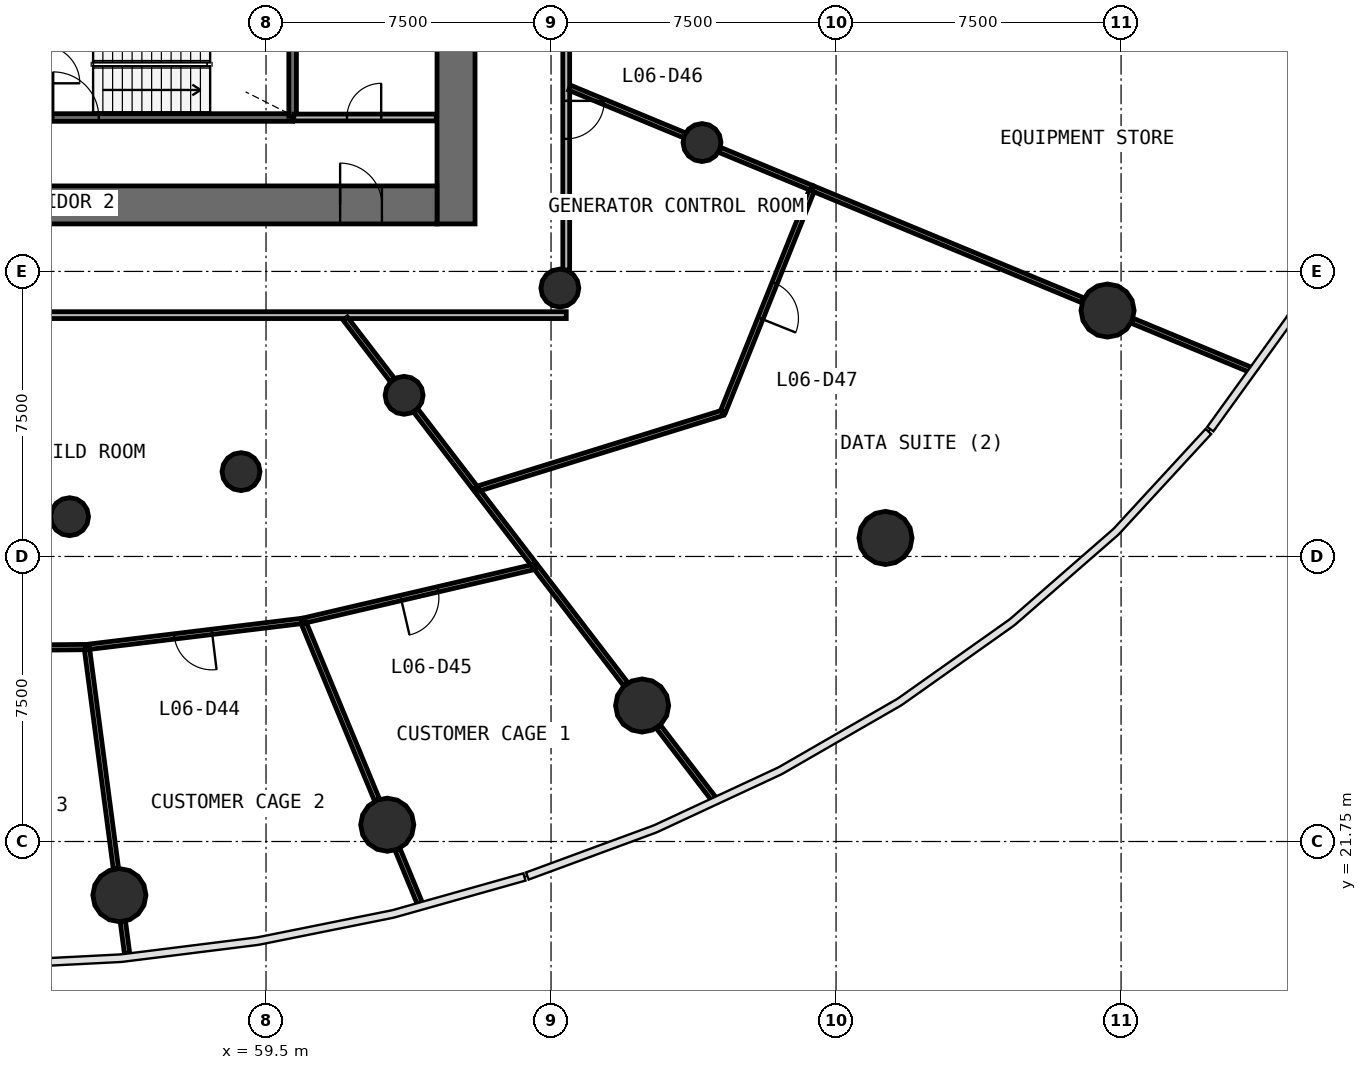
"""IFC4 building model, lengths in metres.
Left out: names, types, materials, properties, quantities, classifications, styles, units other than length and angle.
Written with IfcOpenShell. Run it as: python <this file> out.ifc"""

import sys

from ifc_helpers import new_model, si_unit, direction, frame, frame_2d, origin, origin_2d, place, context, subcontext, project, spatial, rectangle, circle, extrude, source, transform, mapped, element, fill, save


model = new_model("IFC4")
c1 = context("Model", 3, precision=1e-05, world=origin(), true_north=direction((0.0, 1.0)))
c2 = subcontext(c1, "Body", "Model", "MODEL_VIEW")
j1 = project(units=[si_unit("LENGTHUNIT", "METRE"), si_unit("PLANEANGLEUNIT", "RADIAN")], contexts=[c1])
p1 = place(None, origin())
s1 = spatial("IfcSite", under=j1, at=p1, CompositionType="ELEMENT")
p2 = place(p1, origin())
s2 = spatial("IfcBuilding", under=s1, at=p2, CompositionType="ELEMENT")
p3 = place(p2, frame((0.0, 0.0, 27.0)))
s3 = spatial("IfcBuildingStorey", under=s2, at=p3, CompositionType="ELEMENT", Elevation=27.0)
p4 = place(p3, frame((64.5, 38.0, 0.0), z_axis=(0.0, 0.0, 1.0), x_axis=(0.0, 1.0, 0.0)))
e1 = element("IfcWall", 1, at=p4, inside=s3, PredefinedType="SHEAR", context=c2, shape_type="SweptSolid", body=[
    extrude(rectangle(XDim=20.0, YDim=1.0, at=frame_2d((10.0, 0.0))), origin(), (0.0, 0.0, 1.0), 4.4),
])
p5 = place(p4, frame((9.1, 0.0, 0.0)))
e2 = element("IfcOpeningElement", 2, at=p5, cuts=e1, PredefinedType="OPENING", context=c2, shape_type="SweptSolid", body=[
    extrude(rectangle(XDim=1.8, YDim=2.1, at=frame_2d((0.9, 1.05))), frame((0.0, 0.51, 0.0), z_axis=(0.0, -1.0, 0.0), x_axis=(1.0, 0.0, 0.0)), (0.0, 0.0, 1.0), 1.02),
])
p6 = place(p3, frame((40.0, 38.5, 0.0), z_axis=(0.0, 0.0, 1.0), x_axis=(1.0, 0.0, 0.0)))
e3 = element("IfcWall", 3, at=p6, inside=s3, PredefinedType="SHEAR", context=c2, shape_type="SweptSolid", body=[
    extrude(rectangle(XDim=24.0, YDim=1.0, at=frame_2d((12.0, 0.0))), origin(), (0.0, 0.0, 1.0), 4.4),
])
p7 = place(p6, frame((21.45, 0.0, 0.0)))
e4 = element("IfcOpeningElement", 4, at=p7, cuts=e3, PredefinedType="OPENING", context=c2, shape_type="SweptSolid", body=[
    extrude(rectangle(XDim=1.1, YDim=2.1, at=frame_2d((0.55, 1.05))), frame((0.0, 0.51, 0.0), z_axis=(0.0, -1.0, 0.0), x_axis=(1.0, 0.0, 0.0)), (0.0, 0.0, 1.0), 1.02),
])
p8 = place(p6, frame((1.95, 0.0, 0.0)))
e5 = element("IfcOpeningElement", 5, at=p8, cuts=e3, PredefinedType="OPENING", context=c2, shape_type="SweptSolid", body=[
    extrude(rectangle(XDim=1.1, YDim=2.1, at=frame_2d((0.55, 1.05))), frame((0.0, 0.51, 0.0), z_axis=(0.0, -1.0, 0.0), x_axis=(1.0, 0.0, 0.0)), (0.0, 0.0, 1.0), 1.02),
])
m1 = source(origin(), c2, "Body", "SweptSolid", [
    extrude(circle(Radius=0.7, at=origin_2d()), origin(), (0.0, 0.0, 1.0), 4.4),
])
for number, where, z_axis, x_axis in (
    (6, (55.642, 20.339, 0.0), (0.0, 0.0, 1.0), (1.0, 0.0, 0.0)),
    (7, (62.69, 22.191, 0.0), (0.0, 0.0, 1.0), (1.0, 0.0, 0.0)),
    (8, (69.396, 25.328, 0.0), (0.0, 0.0, 1.0), (1.0, 0.0, 0.0)),
    (9, (75.801, 29.737, 0.0), (0.0, 0.0, 1.0), (1.0, 0.0, 0.0)),
    (10, (81.645, 35.721, 0.0), (0.0, 0.0, 1.0), (1.0, 0.0, 0.0)),
):
    element("IfcColumn", number, at=place(p3, frame(where, z_axis=z_axis, x_axis=x_axis)), inside=s3, PredefinedType="COLUMN", context=c2, shape_type="MappedRepresentation", body=[
        mapped(m1, transform((0.0, 0.0, 0.0), scale=1.0)),
    ])
m2 = source(origin(), c2, "Body", "SweptSolid", [
    extrude(circle(Radius=0.5, at=origin_2d()), origin(), (0.0, 0.0, 1.0), 4.4),
])
for number, where, z_axis, x_axis in (
    (11, (54.331, 30.297, 0.0), (0.0, 0.0, 1.0), (1.0, 0.0, 0.0)),
    (12, (58.842, 31.482, 0.0), (0.0, 0.0, 1.0), (1.0, 0.0, 0.0)),
    (13, (63.134, 33.49, 0.0), (0.0, 0.0, 1.0), (1.0, 0.0, 0.0)),
    (14, (67.232, 36.312, 0.0), (0.0, 0.0, 1.0), (1.0, 0.0, 0.0)),
    (15, (70.972, 40.141, 0.0), (0.0, 0.0, 1.0), (1.0, 0.0, 0.0)),
):
    element("IfcColumn", number, at=place(p3, frame(where, z_axis=z_axis, x_axis=x_axis)), inside=s3, PredefinedType="COLUMN", context=c2, shape_type="MappedRepresentation", body=[
        mapped(m2, transform((0.0, 0.0, 0.0), scale=1.0)),
    ])
p9 = place(p3, frame((53.6, 40.8, 0.0), z_axis=(0.0, 0.0, 1.0), x_axis=(1.0, 0.0, 0.0)))
e16 = element("IfcWall", 16, at=p9, inside=s3, PredefinedType="SOLIDWALL", context=c2, shape_type="SweptSolid", body=[
    extrude(rectangle(XDim=6.6, YDim=0.2, at=frame_2d((3.3, 0.0))), origin(), (0.0, 0.0, 1.0), 3.95),
])
p10 = place(p9, frame((0.3, 0.0, 0.0)))
e17 = element("IfcOpeningElement", 17, at=p10, cuts=e16, PredefinedType="OPENING", context=c2, shape_type="SweptSolid", body=[
    extrude(rectangle(XDim=1.2, YDim=2.1, at=frame_2d((0.6, 1.05))), frame((0.0, 0.11, 0.0), z_axis=(0.0, -1.0, 0.0), x_axis=(1.0, 0.0, 0.0)), (0.0, 0.0, 1.0), 0.22),
])
p11 = place(p3, frame((60.2, 40.83, 0.0), z_axis=(0.0, 0.0, 1.0), x_axis=(0.0, 1.0, 0.0)))
e18 = element("IfcWall", 18, at=p11, inside=s3, PredefinedType="SOLIDWALL", context=c2, shape_type="SweptSolid", body=[
    extrude(rectangle(XDim=2.77, YDim=0.2, at=frame_2d((1.385, 0.0))), origin(), (0.0, 0.0, 1.0), 3.95),
])
p12 = place(p3, frame((67.4, 35.6, 0.0), z_axis=(0.0, 0.0, 1.0), x_axis=(-1.0, 0.0, 0.0)))
e19 = element("IfcWall", 19, at=p12, inside=s3, PredefinedType="PARTITIONING", context=c2, shape_type="SweptSolid", body=[
    extrude(rectangle(XDim=30.8, YDim=0.18, at=frame_2d((15.4, 0.0))), origin(), (0.0, 0.0, 1.0), 3.05),
])
p13 = place(p12, frame((17.35, 0.0, 0.0)))
e20 = element("IfcOpeningElement", 20, at=p13, cuts=e19, PredefinedType="OPENING", context=c2, shape_type="SweptSolid", body=[
    extrude(rectangle(XDim=1.0, YDim=2.1, at=frame_2d((0.5, 1.05))), frame((0.0, 0.1, 0.0), z_axis=(0.0, -1.0, 0.0), x_axis=(1.0, 0.0, 0.0)), (0.0, 0.0, 1.0), 0.2),
])
p14 = place(p12, frame((14.95, 0.0, 0.0)))
e21 = element("IfcOpeningElement", 21, at=p14, cuts=e19, PredefinedType="OPENING", context=c2, shape_type="SweptSolid", body=[
    extrude(rectangle(XDim=1.0, YDim=2.1, at=frame_2d((0.5, 1.05))), frame((0.0, 0.1, 0.0), z_axis=(0.0, -1.0, 0.0), x_axis=(1.0, 0.0, 0.0)), (0.0, 0.0, 1.0), 0.2),
])
p15 = place(p3, frame((67.4, 60.37, 0.0), z_axis=(0.0, 0.0, 1.0), x_axis=(0.0, -1.0, 0.0)))
e22 = element("IfcWall", 22, at=p15, inside=s3, PredefinedType="PARTITIONING", context=c2, shape_type="SweptSolid", body=[
    extrude(rectangle(XDim=23.583, YDim=0.18, at=frame_2d((11.791, 0.0))), origin(), (0.0, 0.0, 1.0), 3.05),
])
p16 = place(p15, frame((11.833, 0.0, 0.0)))
e23 = element("IfcOpeningElement", 23, at=p16, cuts=e22, PredefinedType="OPENING", context=c2, shape_type="SweptSolid", body=[
    extrude(rectangle(XDim=0.9, YDim=2.1, at=frame_2d((0.45, 1.05))), frame((0.0, 0.1, 0.0), z_axis=(0.0, -1.0, 0.0), x_axis=(1.0, 0.0, 0.0)), (0.0, 0.0, 1.0), 0.2),
])
p17 = place(p15, frame((10.433, 0.0, 0.0)))
e24 = element("IfcOpeningElement", 24, at=p17, cuts=e22, PredefinedType="OPENING", context=c2, shape_type="SweptSolid", body=[
    extrude(rectangle(XDim=0.9, YDim=2.1, at=frame_2d((0.45, 1.05))), frame((0.0, 0.1, 0.0), z_axis=(0.0, -1.0, 0.0), x_axis=(1.0, 0.0, 0.0)), (0.0, 0.0, 1.0), 0.2),
])
p18 = place(p15, frame((7.833, 0.0, 0.0)))
e25 = element("IfcOpeningElement", 25, at=p18, cuts=e22, PredefinedType="OPENING", context=c2, shape_type="SweptSolid", body=[
    extrude(rectangle(XDim=0.9, YDim=2.1, at=frame_2d((0.45, 1.05))), frame((0.0, 0.1, 0.0), z_axis=(0.0, -1.0, 0.0), x_axis=(1.0, 0.0, 0.0)), (0.0, 0.0, 1.0), 0.2),
])
p19 = place(p15, frame((19.133, 0.0, 0.0)))
e26 = element("IfcOpeningElement", 26, at=p19, cuts=e22, PredefinedType="OPENING", context=c2, shape_type="SweptSolid", body=[
    extrude(rectangle(XDim=1.0, YDim=2.1, at=frame_2d((0.5, 1.05))), frame((0.0, 0.1, 0.0), z_axis=(0.0, -1.0, 0.0), x_axis=(1.0, 0.0, 0.0)), (0.0, 0.0, 1.0), 0.2),
])
p20 = place(p15, frame((14.732, 0.0, 0.0)))
e27 = element("IfcOpeningElement", 27, at=p20, cuts=e22, PredefinedType="OPENING", context=c2, shape_type="SweptSolid", body=[
    extrude(rectangle(XDim=1.0, YDim=2.1, at=frame_2d((0.5, 1.05))), frame((0.0, 0.1, 0.0), z_axis=(0.0, -1.0, 0.0), x_axis=(1.0, 0.0, 0.0)), (0.0, 0.0, 1.0), 0.2),
])
p21 = place(p3, frame((60.23, 40.8, 0.0), z_axis=(0.0, 0.0, 1.0), x_axis=(1.0, 0.0, 0.0)))
e28 = element("IfcWall", 28, at=p21, inside=s3, PredefinedType="PARTITIONING", context=c2, shape_type="SweptSolid", body=[
    extrude(rectangle(XDim=3.75, YDim=0.18, at=frame_2d((1.875, 0.0))), origin(), (0.0, 0.0, 1.0), 3.95),
])
p22 = place(p21, frame((1.4, 0.0, 0.0)))
e29 = element("IfcOpeningElement", 29, at=p22, cuts=e28, PredefinedType="OPENING", context=c2, shape_type="SweptSolid", body=[
    extrude(rectangle(XDim=0.9, YDim=2.1, at=frame_2d((0.45, 1.05))), frame((0.0, 0.1, 0.0), z_axis=(0.0, -1.0, 0.0), x_axis=(1.0, 0.0, 0.0)), (0.0, 0.0, 1.0), 0.2),
])
p23 = place(p3, frame((73.883, 38.936, 0.0), z_axis=(0.0, 0.0, 1.0), x_axis=(0.923874550421, -0.382695459974, 0.0)))
e30 = element("IfcWall", 30, at=p23, inside=s3, PredefinedType="PARTITIONING", context=c2, shape_type="SweptSolid", body=[
    extrude(rectangle(XDim=7.696, YDim=0.14, at=frame_2d((3.848, 0.0))), origin(), (0.0, 0.0, 1.0), 3.05),
])
p24 = place(p3, frame((65.03, 31.02, 0.0), z_axis=(0.0, 0.0, 1.0), x_axis=(0.955222723313, 0.295887730172, 0.0)))
e31 = element("IfcWall", 31, at=p24, inside=s3, PredefinedType="PARTITIONING", context=c2, shape_type="SweptSolid", body=[
    extrude(rectangle(XDim=6.787, YDim=0.14, at=frame_2d((3.393, 0.0))), origin(), (0.0, 0.0, 1.0), 3.05),
])
p25 = place(p3, frame((73.857, 38.871, 0.0), z_axis=(0.0, 0.0, 1.0), x_axis=(-0.372364534272, -0.928086555024, 0.0)))
e32 = element("IfcWall", 32, at=p25, inside=s3, PredefinedType="PARTITIONING", context=c2, shape_type="SweptSolid", body=[
    extrude(rectangle(XDim=6.266, YDim=0.14, at=frame_2d((3.133, 0.0))), origin(), (0.0, 0.0, 1.0), 3.05),
])
p26 = place(p25, frame((2.616, 0.0, 0.0)))
e33 = element("IfcOpeningElement", 33, at=p26, cuts=e32, PredefinedType="OPENING", context=c2, shape_type="SweptSolid", body=[
    extrude(rectangle(XDim=1.0, YDim=2.1, at=frame_2d((0.5, 1.05))), frame((0.0, 0.08, 0.0), z_axis=(0.0, -1.0, 0.0), x_axis=(1.0, 0.0, 0.0)), (0.0, 0.0, 1.0), 0.16),
])
p27 = place(p3, frame((66.592, 28.984, 0.0), z_axis=(0.0, 0.0, 1.0), x_axis=(-0.973907326405, -0.226946071954, 0.0)))
e34 = element("IfcWall", 34, at=p27, inside=s3, PredefinedType="PARTITIONING", context=c2, shape_type="SweptSolid", body=[
    extrude(rectangle(XDim=6.288, YDim=0.14, at=frame_2d((3.144, 0.0))), origin(), (0.0, 0.0, 1.0), 3.05),
])
p28 = place(p27, frame((2.638, 0.0, 0.0)))
e35 = element("IfcOpeningElement", 35, at=p28, cuts=e34, PredefinedType="OPENING", context=c2, shape_type="SweptSolid", body=[
    extrude(rectangle(XDim=1.0, YDim=2.1, at=frame_2d((0.5, 1.05))), frame((0.0, 0.08, 0.0), z_axis=(0.0, -1.0, 0.0), x_axis=(1.0, 0.0, 0.0)), (0.0, 0.0, 1.0), 0.16),
])
p29 = place(p3, frame((54.782, 26.866, 0.0), z_axis=(0.0, 0.0, 1.0), x_axis=(0.130542585571, -0.99144270301, 0.0)))
e36 = element("IfcWall", 36, at=p29, inside=s3, PredefinedType="PARTITIONING", context=c2, shape_type="SweptSolid", body=[
    extrude(rectangle(XDim=5.88, YDim=0.14, at=frame_2d((2.94, 0.0))), origin(), (0.0, 0.0, 1.0), 3.05),
])
p30 = place(p3, frame((60.438, 27.553, 0.0), z_axis=(0.0, 0.0, 1.0), x_axis=(-0.992716024963, -0.12047777298, 0.0)))
e37 = element("IfcWall", 37, at=p30, inside=s3, PredefinedType="PARTITIONING", context=c2, shape_type="SweptSolid", body=[
    extrude(rectangle(XDim=5.627, YDim=0.14, at=frame_2d((2.814, 0.0))), origin(), (0.0, 0.0, 1.0), 3.05),
])
p31 = place(p30, frame((2.377, 0.0, 0.0)))
e38 = element("IfcOpeningElement", 38, at=p31, cuts=e37, PredefinedType="OPENING", context=c2, shape_type="SweptSolid", body=[
    extrude(rectangle(XDim=1.0, YDim=2.1, at=frame_2d((0.5, 1.05))), frame((0.0, 0.08, 0.0), z_axis=(0.0, -1.0, 0.0), x_axis=(1.0, 0.0, 0.0)), (0.0, 0.0, 1.0), 0.16),
])
p32 = place(p3, frame((54.752, 26.866, 0.0), z_axis=(0.0, 0.0, 1.0), x_axis=(-0.999953808147, -0.009611533326, 0.0)))
e39 = element("IfcWall", 39, at=p32, inside=s3, PredefinedType="PARTITIONING", context=c2, shape_type="SweptSolid", body=[
    extrude(rectangle(XDim=5.512, YDim=0.14, at=frame_2d((2.756, 0.0))), origin(), (0.0, 0.0, 1.0), 3.05),
])
p33 = place(p32, frame((2.262, 0.0, 0.0)))
e40 = element("IfcOpeningElement", 40, at=p33, cuts=e39, PredefinedType="OPENING", context=c2, shape_type="SweptSolid", body=[
    extrude(rectangle(XDim=1.0, YDim=2.1, at=frame_2d((0.5, 1.05))), frame((0.0, 0.08, 0.0), z_axis=(0.0, -1.0, 0.0), x_axis=(1.0, 0.0, 0.0)), (0.0, 0.0, 1.0), 0.16),
])
p34 = place(p3, frame((60.495, 27.491, 0.0), z_axis=(0.0, 0.0, 1.0), x_axis=(0.382674650858, -0.923883169882, 0.0)))
e41 = element("IfcWall", 41, at=p34, inside=s3, PredefinedType="PARTITIONING", context=c2, shape_type="SweptSolid", body=[
    extrude(rectangle(XDim=5.031, YDim=0.14, at=frame_2d((2.516, 0.0))), origin(), (0.0, 0.0, 1.0), 3.05),
])
p35 = place(p3, frame((66.61, 28.96, 0.0), z_axis=(0.0, 0.0, 1.0), x_axis=(0.608747750124, -0.793363836282, 0.0)))
e42 = element("IfcWall", 42, at=p35, inside=s3, PredefinedType="PARTITIONING", context=c2, shape_type="SweptSolid", body=[
    extrude(rectangle(XDim=3.873, YDim=0.14, at=frame_2d((1.937, 0.0))), origin(), (0.0, 0.0, 1.0), 3.05),
])
p36 = place(p3, frame((82.296, 35.451, 0.0), z_axis=(0.0, 0.0, 1.0), x_axis=(0.923894038604, -0.382648409681, 0.0)))
e43 = element("IfcWall", 43, at=p36, inside=s3, PredefinedType="PARTITIONING", context=c2, shape_type="SweptSolid", body=[
    extrude(rectangle(XDim=3.368, YDim=0.14, at=frame_2d((1.684, 0.0))), origin(), (0.0, 0.0, 1.0), 3.05),
])
p37 = place(p3, frame((67.49, 41.584, 0.0), z_axis=(0.0, 0.0, 1.0), x_axis=(0.923911109142, -0.382607190737, 0.0)))
e44 = element("IfcWall", 44, at=p37, inside=s3, PredefinedType="PARTITIONING", context=c2, shape_type="SweptSolid", body=[
    extrude(rectangle(XDim=3.264, YDim=0.14, at=frame_2d((1.632, 0.0))), origin(), (0.0, 0.0, 1.0), 3.05),
])
p38 = place(p3, frame((71.439, 39.948, 0.0), z_axis=(0.0, 0.0, 1.0), x_axis=(0.923867754, -0.382711866968, 0.0)))
e45 = element("IfcWall", 45, at=p38, inside=s3, PredefinedType="PARTITIONING", context=c2, shape_type="SweptSolid", body=[
    extrude(rectangle(XDim=2.615, YDim=0.14, at=frame_2d((1.307, 0.0))), origin(), (0.0, 0.0, 1.0), 3.05),
])
p39 = place(p3, frame((63.441, 33.09, 0.0), z_axis=(0.0, 0.0, 1.0), x_axis=(0.608791083389, -0.793330584805, 0.0)))
e46 = element("IfcWall", 46, at=p39, inside=s3, PredefinedType="PARTITIONING", context=c2, shape_type="SweptSolid", body=[
    extrude(rectangle(XDim=2.58, YDim=0.14, at=frame_2d((1.29, 0.0))), origin(), (0.0, 0.0, 1.0), 3.05),
])
p40 = place(p3, frame((65.075, 30.96, 0.0), z_axis=(0.0, 0.0, 1.0), x_axis=(0.608732944488, -0.79337519642, 0.0)))
e47 = element("IfcWall", 47, at=p40, inside=s3, PredefinedType="PARTITIONING", context=c2, shape_type="SweptSolid", body=[
    extrude(rectangle(XDim=2.414, YDim=0.14, at=frame_2d((1.207, 0.0))), origin(), (0.0, 0.0, 1.0), 3.05),
])
p41 = place(p3, frame((69.825, 24.77, 0.0), z_axis=(0.0, 0.0, 1.0), x_axis=(0.608785845346, -0.793334604379, 0.0)))
e48 = element("IfcWall", 48, at=p41, inside=s3, PredefinedType="PARTITIONING", context=c2, shape_type="SweptSolid", body=[
    extrude(rectangle(XDim=2.386, YDim=0.14, at=frame_2d((1.193, 0.0))), origin(), (0.0, 0.0, 1.0), 3.05),
])
p42 = place(p3, frame((61.584, 35.51, 0.0), z_axis=(0.0, 0.0, 1.0), x_axis=(0.608727763541, -0.793379171578, 0.0)))
e49 = element("IfcWall", 49, at=p42, inside=s3, PredefinedType="PARTITIONING", context=c2, shape_type="SweptSolid", body=[
    extrude(rectangle(XDim=2.042, YDim=0.14, at=frame_2d((1.021, 0.0))), origin(), (0.0, 0.0, 1.0), 3.05),
])
p43 = place(p3, frame((62.96, 21.54, 0.0), z_axis=(0.0, 0.0, 1.0), x_axis=(0.382521566015, -0.923946563138, 0.0)))
e50 = element("IfcWall", 50, at=p43, inside=s3, PredefinedType="PARTITIONING", context=c2, shape_type="SweptSolid", body=[
    extrude(rectangle(XDim=1.524, YDim=0.14, at=frame_2d((0.762, 0.0))), origin(), (0.0, 0.0, 1.0), 3.05),
])
p44 = place(p3, frame((55.734, 19.64, 0.0), z_axis=(0.0, 0.0, 1.0), x_axis=(0.130342122338, -0.991469077251, 0.0)))
e51 = element("IfcWall", 51, at=p44, inside=s3, PredefinedType="PARTITIONING", context=c2, shape_type="SweptSolid", body=[
    extrude(rectangle(XDim=0.843, YDim=0.14, at=frame_2d((0.421, 0.0))), origin(), (0.0, 0.0, 1.0), 3.05),
])
m3 = source(origin(), c2, "Body", "SweptSolid", [
    extrude(rectangle(XDim=1.2, YDim=2.1, at=frame_2d((0.6, 1.05))), frame((0.0, 0.025, 0.0), z_axis=(0.0, -1.0, 0.0), x_axis=(1.0, 0.0, 0.0)), (0.0, 0.0, 1.0), 0.05),
])
p45 = place(p10, origin())
e52 = element("IfcDoor", 52, at=p45, inside=s3, OperationType="SINGLE_SWING_LEFT", PredefinedType="DOOR", context=c2, shape_type="MappedRepresentation", body=[
    mapped(m3, transform((0.0, 0.0, 0.0), scale=1.0)),
])
fill(e17, e52)
m4 = source(origin(), c2, "Body", "SweptSolid", [
    extrude(rectangle(XDim=1.1, YDim=2.1, at=frame_2d((0.55, 1.05))), frame((0.0, 0.025, 0.0), z_axis=(0.0, -1.0, 0.0), x_axis=(1.0, 0.0, 0.0)), (0.0, 0.0, 1.0), 0.05),
])
p46 = place(p7, origin())
e53 = element("IfcDoor", 53, at=p46, inside=s3, OperationType="SINGLE_SWING_LEFT", PredefinedType="DOOR", context=c2, shape_type="MappedRepresentation", body=[
    mapped(m4, transform((0.0, 0.0, 0.0), scale=1.0)),
])
fill(e4, e53)
m5 = source(origin(), c2, "Body", "SweptSolid", [
    extrude(rectangle(XDim=1.0, YDim=2.1, at=frame_2d((0.5, 1.05))), frame((0.0, 0.025, 0.0), z_axis=(0.0, -1.0, 0.0), x_axis=(1.0, 0.0, 0.0)), (0.0, 0.0, 1.0), 0.05),
])
p47 = place(p31, origin())
e54 = element("IfcDoor", 54, at=p47, inside=s3, OperationType="SINGLE_SWING_LEFT", PredefinedType="DOOR", context=c2, shape_type="MappedRepresentation", body=[
    mapped(m5, transform((0.0, 0.0, 0.0), scale=1.0)),
])
fill(e38, e54)
p48 = place(p28, origin())
e55 = element("IfcDoor", 55, at=p48, inside=s3, OperationType="SINGLE_SWING_RIGHT", PredefinedType="DOOR", context=c2, shape_type="MappedRepresentation", body=[
    mapped(m5, transform((0.0, 0.0, 0.0), scale=1.0)),
])
fill(e35, e55)
p49 = place(p19, origin())
e56 = element("IfcDoor", 56, at=p49, inside=s3, OperationType="SINGLE_SWING_LEFT", PredefinedType="DOOR", context=c2, shape_type="MappedRepresentation", body=[
    mapped(m5, transform((0.0, 0.0, 0.0), scale=1.0)),
])
fill(e26, e56)
p50 = place(p26, origin())
e57 = element("IfcDoor", 57, at=p50, inside=s3, OperationType="SINGLE_SWING_RIGHT", PredefinedType="DOOR", context=c2, shape_type="MappedRepresentation", body=[
    mapped(m5, transform((0.0, 0.0, 0.0), scale=1.0)),
])
fill(e33, e57)
m6 = source(origin(), c2, "Body", "SweptSolid", [
    extrude(rectangle(XDim=0.9, YDim=2.1, at=frame_2d((0.45, 1.05))), frame((0.0, 0.025, 0.0), z_axis=(0.0, -1.0, 0.0), x_axis=(1.0, 0.0, 0.0)), (0.0, 0.0, 1.0), 0.05),
])
p51 = place(p22, origin())
e58 = element("IfcDoor", 58, at=p51, inside=s3, OperationType="SINGLE_SWING_RIGHT", PredefinedType="DOOR", context=c2, shape_type="MappedRepresentation", body=[
    mapped(m6, transform((0.0, 0.0, 0.0), scale=1.0)),
])
fill(e29, e58)
save(model, sys.argv[1])
